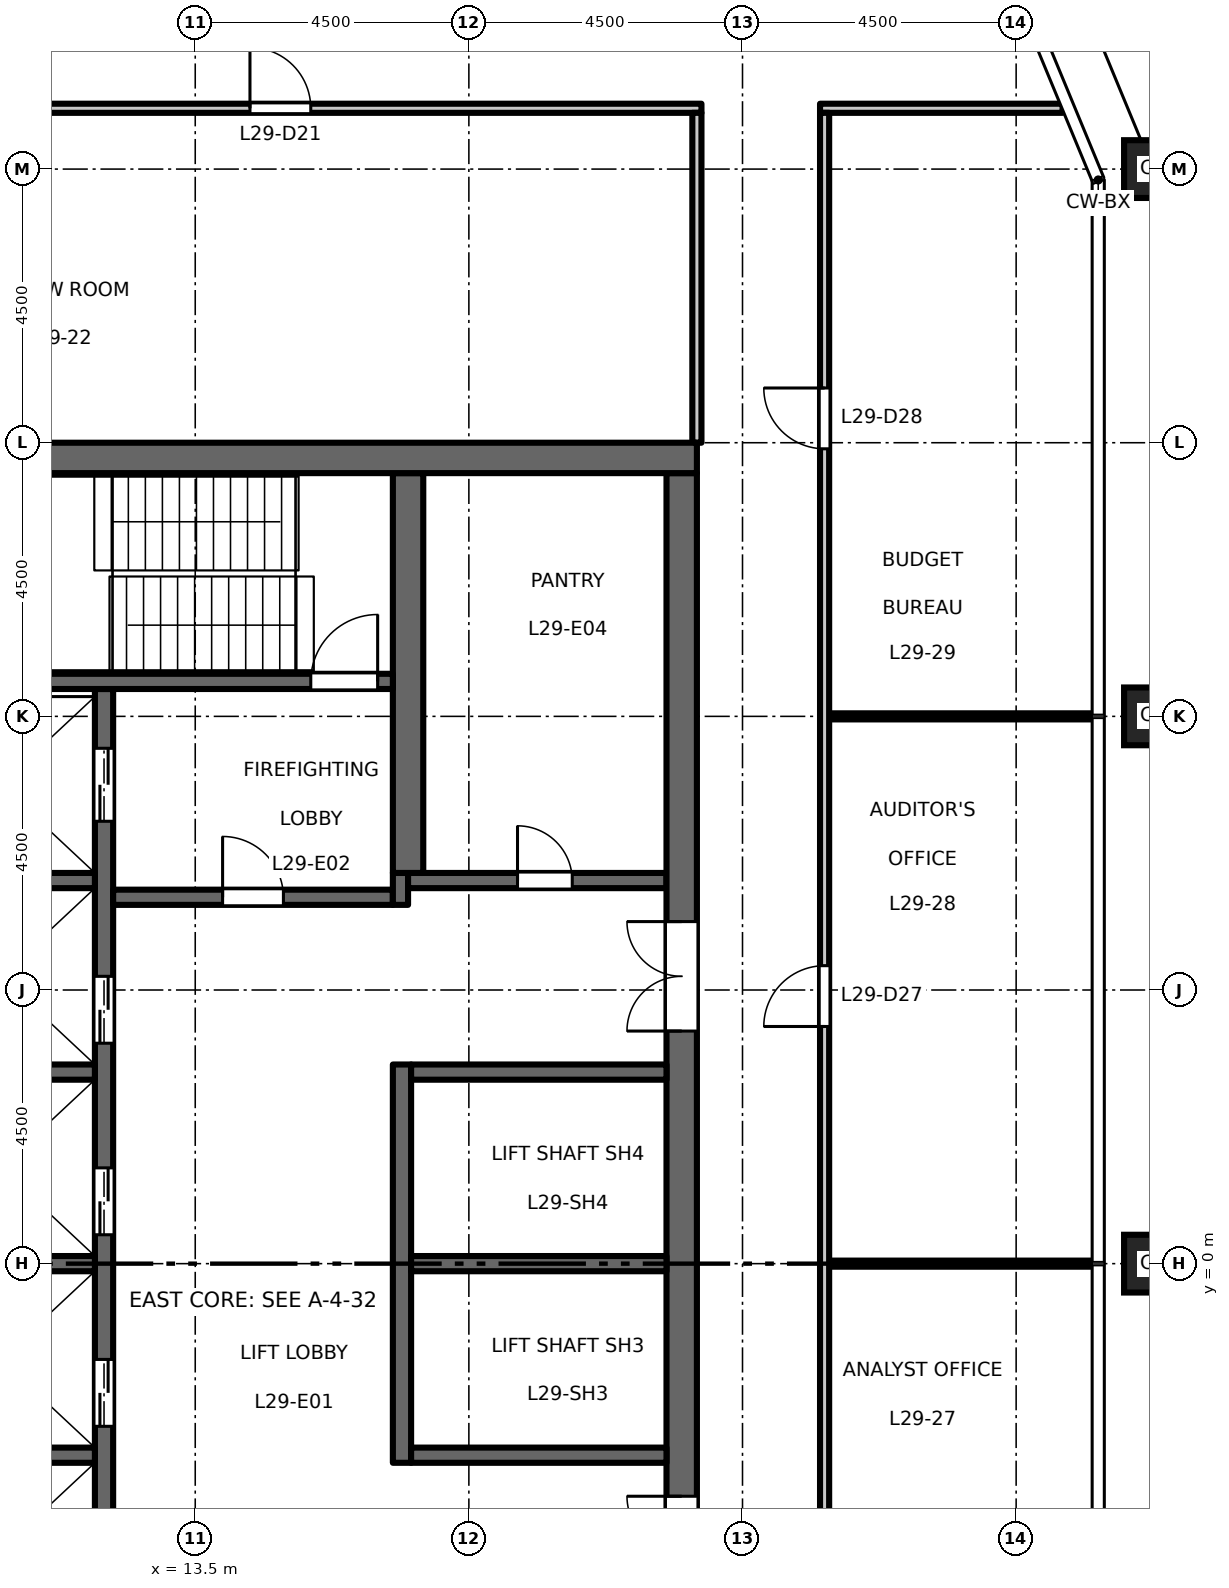
"""IFC4 building model, lengths in metres.
Left out: names, types, materials, properties, quantities, classifications, styles, units other than length and angle.
Written with IfcOpenShell. Run it as: python <this file> out.ifc"""

import sys

from ifc_helpers import new_model, si_unit, direction, frame, frame_2d, origin, origin_2d, place, context, subcontext, project, spatial, rectangle, hollow_rectangle, extrude, element, fill, save


model = new_model("IFC4")
c1 = context("Model", 3, precision=1e-05, world=origin(), true_north=direction((0.0, 1.0)))
c2 = subcontext(c1, "Body", "Model", "MODEL_VIEW")
j1 = project(units=[si_unit("LENGTHUNIT", "METRE"), si_unit("PLANEANGLEUNIT", "RADIAN")], contexts=[c1])
p1 = place(None, origin())
s1 = spatial("IfcSite", under=j1, at=p1, CompositionType="ELEMENT")
p2 = place(p1, origin())
s2 = spatial("IfcBuilding", under=s1, at=p2, CompositionType="ELEMENT")
p3 = place(p2, frame((0.0, 0.0, 136.2)))
s3 = spatial("IfcBuildingStorey", under=s2, at=p3, CompositionType="ELEMENT", Elevation=136.2)
for number, where, z_axis, x_axis in (
    (1, (29.25, 0.0, 0.0), (0.0, 0.0, 1.0), (1.0, 0.0, 0.0)),
    (2, (29.25, 9.0, 0.0), (0.0, 0.0, 1.0), (1.0, 0.0, 0.0)),
    (3, (29.25, 18.0, 0.0), (0.0, 0.0, 1.0), (1.0, 0.0, 0.0)),
):
    element("IfcColumn", number, at=place(p3, frame(where, z_axis=z_axis, x_axis=x_axis)), inside=s3, PredefinedType="COLUMN", context=c2, shape_type="SweptSolid", body=[
        extrude(hollow_rectangle(XDim=0.95, YDim=0.95, WallThickness=0.055, at=origin_2d()), origin(), (0.0, 0.0, 1.0), 4.5),
    ])
p4 = place(p3, frame((12.0, -9.45, 0.0), z_axis=(0.0, 0.0, 1.0), x_axis=(0.0, 1.0, 0.0)))
e4 = element("IfcWall", 4, at=p4, inside=s3, PredefinedType="SHEAR", context=c2, shape_type="SweptSolid", body=[
    extrude(rectangle(XDim=18.9, YDim=0.3, at=frame_2d((9.45, 0.0))), origin(), (0.0, 0.0, 1.0), 4.35),
])
p5 = place(p4, frame((3.625, 0.0, 0.0)))
e5 = element("IfcOpeningElement", 5, at=p5, cuts=e4, PredefinedType="OPENING", context=c2, shape_type="SweptSolid", body=[
    extrude(rectangle(XDim=1.1, YDim=2.1, at=frame_2d((0.55, 1.05))), frame((0.0, 0.16, 0.0), z_axis=(0.0, -1.0, 0.0), x_axis=(1.0, 0.0, 0.0)), (0.0, 0.0, 1.0), 0.32),
])
p6 = place(p4, frame((6.775, 0.0, 0.0)))
e6 = element("IfcOpeningElement", 6, at=p6, cuts=e4, PredefinedType="OPENING", context=c2, shape_type="SweptSolid", body=[
    extrude(rectangle(XDim=1.1, YDim=2.1, at=frame_2d((0.55, 1.05))), frame((0.0, 0.16, 0.0), z_axis=(0.0, -1.0, 0.0), x_axis=(1.0, 0.0, 0.0)), (0.0, 0.0, 1.0), 0.32),
])
p7 = place(p4, frame((9.925, 0.0, 0.0)))
e7 = element("IfcOpeningElement", 7, at=p7, cuts=e4, PredefinedType="OPENING", context=c2, shape_type="SweptSolid", body=[
    extrude(rectangle(XDim=1.1, YDim=2.1, at=frame_2d((0.55, 1.05))), frame((0.0, 0.16, 0.0), z_axis=(0.0, -1.0, 0.0), x_axis=(1.0, 0.0, 0.0)), (0.0, 0.0, 1.0), 0.32),
])
p8 = place(p4, frame((13.075, 0.0, 0.0)))
e8 = element("IfcOpeningElement", 8, at=p8, cuts=e4, PredefinedType="OPENING", context=c2, shape_type="SweptSolid", body=[
    extrude(rectangle(XDim=1.1, YDim=2.1, at=frame_2d((0.55, 1.05))), frame((0.0, 0.16, 0.0), z_axis=(0.0, -1.0, 0.0), x_axis=(1.0, 0.0, 0.0)), (0.0, 0.0, 1.0), 0.32),
])
p9 = place(p4, frame((16.725, 0.0, 0.0)))
e9 = element("IfcOpeningElement", 9, at=p9, cuts=e4, PredefinedType="OPENING", context=c2, shape_type="SweptSolid", body=[
    extrude(rectangle(XDim=1.2, YDim=2.1, at=frame_2d((0.6, 1.05))), frame((0.0, 0.16, 0.0), z_axis=(0.0, -1.0, 0.0), x_axis=(1.0, 0.0, 0.0)), (0.0, 0.0, 1.0), 0.32),
])
p10 = place(p4, frame((0.975, 0.0, 0.0)))
e10 = element("IfcOpeningElement", 10, at=p10, cuts=e4, PredefinedType="OPENING", context=c2, shape_type="SweptSolid", body=[
    extrude(rectangle(XDim=1.2, YDim=2.1, at=frame_2d((0.6, 1.05))), frame((0.0, 0.16, 0.0), z_axis=(0.0, -1.0, 0.0), x_axis=(1.0, 0.0, 0.0)), (0.0, 0.0, 1.0), 0.32),
])
p11 = place(p3, frame((12.15, 6.025, 0.0), z_axis=(0.0, 0.0, 1.0), x_axis=(1.0, 0.0, 0.0)))
e11 = element("IfcWall", 11, at=p11, inside=s3, PredefinedType="SHEAR", context=c2, shape_type="SweptSolid", body=[
    extrude(rectangle(XDim=4.6, YDim=0.25, at=frame_2d((2.3, 0.0))), origin(), (0.0, 0.0, 1.0), 4.35),
])
p12 = place(p11, frame((1.8, 0.0, 0.0)))
e12 = element("IfcOpeningElement", 12, at=p12, cuts=e11, PredefinedType="OPENING", context=c2, shape_type="SweptSolid", body=[
    extrude(rectangle(XDim=1.0, YDim=2.1, at=frame_2d((0.5, 1.05))), frame((0.0, 0.135, 0.0), z_axis=(0.0, -1.0, 0.0), x_axis=(1.0, 0.0, 0.0)), (0.0, 0.0, 1.0), 0.27),
])
p13 = place(p3, frame((16.875, 5.9, 0.0), z_axis=(0.0, 0.0, 1.0), x_axis=(0.0, 1.0, 0.0)))
e13 = element("IfcWall", 13, at=p13, inside=s3, PredefinedType="SHEAR", context=c2, shape_type="SweptSolid", body=[
    extrude(rectangle(XDim=0.525, YDim=0.25, at=frame_2d((0.263, 0.0))), origin(), (0.0, 0.0, 1.0), 4.35),
])
p14 = place(p3, frame((17.0, 6.3, 0.0), z_axis=(0.0, 0.0, 1.0), x_axis=(1.0, 0.0, 0.0)))
e14 = element("IfcWall", 14, at=p14, inside=s3, PredefinedType="SHEAR", context=c2, shape_type="SweptSolid", body=[
    extrude(rectangle(XDim=4.25, YDim=0.25, at=frame_2d((2.125, 0.0))), origin(), (0.0, 0.0, 1.0), 4.35),
])
p15 = place(p14, frame((1.8, 0.0, 0.0)))
e15 = element("IfcOpeningElement", 15, at=p15, cuts=e14, PredefinedType="OPENING", context=c2, shape_type="SweptSolid", body=[
    extrude(rectangle(XDim=0.9, YDim=2.1, at=frame_2d((0.45, 1.05))), frame((0.0, 0.135, 0.0), z_axis=(0.0, -1.0, 0.0), x_axis=(1.0, 0.0, 0.0)), (0.0, 0.0, 1.0), 0.27),
])
p16 = place(p3, frame((21.5, -13.0, 0.0), z_axis=(0.0, 0.0, 1.0), x_axis=(0.0, 1.0, 0.0)))
e16 = element("IfcWall", 16, at=p16, inside=s3, PredefinedType="SHEAR", context=c2, shape_type="SweptSolid", body=[
    extrude(rectangle(XDim=26.0, YDim=0.5, at=frame_2d((13.0, 0.0))), origin(), (0.0, 0.0, 1.0), 4.35),
])
p17 = place(p16, frame((16.825, 0.0, 0.0)))
e17 = element("IfcOpeningElement", 17, at=p17, cuts=e16, PredefinedType="OPENING", context=c2, shape_type="SweptSolid", body=[
    extrude(rectangle(XDim=1.8, YDim=2.1, at=frame_2d((0.9, 1.05))), frame((0.0, 0.26, 0.0), z_axis=(0.0, -1.0, 0.0), x_axis=(1.0, 0.0, 0.0)), (0.0, 0.0, 1.0), 0.52),
])
p18 = place(p16, frame((7.375, 0.0, 0.0)))
e18 = element("IfcOpeningElement", 18, at=p18, cuts=e16, PredefinedType="OPENING", context=c2, shape_type="SweptSolid", body=[
    extrude(rectangle(XDim=1.8, YDim=2.1, at=frame_2d((0.9, 1.05))), frame((0.0, 0.26, 0.0), z_axis=(0.0, -1.0, 0.0), x_axis=(1.0, 0.0, 0.0)), (0.0, 0.0, 1.0), 0.52),
])
p19 = place(p16, frame((2.65, 0.0, 0.0)))
e19 = element("IfcOpeningElement", 19, at=p19, cuts=e16, PredefinedType="OPENING", context=c2, shape_type="SweptSolid", body=[
    extrude(rectangle(XDim=0.9, YDim=2.1, at=frame_2d((0.45, 1.05))), frame((0.0, 0.26, 0.0), z_axis=(0.0, -1.0, 0.0), x_axis=(1.0, 0.0, 0.0)), (0.0, 0.0, 1.0), 0.52),
])
p20 = place(p3, frame((16.9, -3.275, 0.0), z_axis=(0.0, 0.0, 1.0), x_axis=(0.0, 1.0, 0.0)))
e20 = element("IfcWall", 20, at=p20, inside=s3, PredefinedType="SHEAR", context=c2, shape_type="SweptSolid", body=[
    extrude(rectangle(XDim=6.55, YDim=0.3, at=frame_2d((3.275, 0.0))), origin(), (0.0, 0.0, 1.0), 4.35),
])
for number, where, z_axis, x_axis in (
    (21, (17.05, 0.0, 0.0), (0.0, 0.0, 1.0), (1.0, 0.0, 0.0)),
    (22, (17.05, 3.15, 0.0), (0.0, 0.0, 1.0), (1.0, 0.0, 0.0)),
    (23, (17.05, -3.15, 0.0), (0.0, 0.0, 1.0), (1.0, 0.0, 0.0)),
):
    element("IfcWall", number, at=place(p3, frame(where, z_axis=z_axis, x_axis=x_axis)), inside=s3, PredefinedType="SHEAR", context=c2, shape_type="SweptSolid", body=[
        extrude(rectangle(XDim=4.2, YDim=0.25, at=frame_2d((2.1, 0.0))), origin(), (0.0, 0.0, 1.0), 4.35),
    ])
p21 = place(p3, frame((17.0, 6.425, 0.0), z_axis=(0.0, 0.0, 1.0), x_axis=(0.0, 1.0, 0.0)))
e24 = element("IfcWall", 24, at=p21, inside=s3, PredefinedType="SHEAR", context=c2, shape_type="SweptSolid", body=[
    extrude(rectangle(XDim=6.575, YDim=0.5, at=frame_2d((3.288, 0.0))), origin(), (0.0, 0.0, 1.0), 4.35),
])
for number, where, z_axis, x_axis in (
    (25, (8.75, 0.0, 0.0), (0.0, 0.0, 1.0), (1.0, 0.0, 0.0)),
    (26, (8.75, 3.15, 0.0), (0.0, 0.0, 1.0), (1.0, 0.0, 0.0)),
    (27, (8.75, 6.3, 0.0), (0.0, 0.0, 1.0), (1.0, 0.0, 0.0)),
    (28, (8.75, -3.15, 0.0), (0.0, 0.0, 1.0), (1.0, 0.0, 0.0)),
):
    element("IfcWall", number, at=place(p3, frame(where, z_axis=z_axis, x_axis=x_axis)), inside=s3, PredefinedType="SHEAR", context=c2, shape_type="SweptSolid", body=[
        extrude(rectangle(XDim=3.1, YDim=0.25, at=frame_2d((1.55, 0.0))), origin(), (0.0, 0.0, 1.0), 4.35),
    ])
p22 = place(p3, frame((8.75, 9.575, 0.0), z_axis=(0.0, 0.0, 1.0), x_axis=(1.0, 0.0, 0.0)))
e29 = element("IfcWall", 29, at=p22, inside=s3, PredefinedType="SHEAR", context=c2, shape_type="SweptSolid", body=[
    extrude(rectangle(XDim=8.0, YDim=0.25, at=frame_2d((4.0, 0.0))), origin(), (0.0, 0.0, 1.0), 4.35),
])
p23 = place(p22, frame((6.65, 0.0, 0.0)))
e30 = element("IfcOpeningElement", 30, at=p23, cuts=e29, PredefinedType="OPENING", context=c2, shape_type="SweptSolid", body=[
    extrude(rectangle(XDim=1.1, YDim=2.1, at=frame_2d((0.55, 1.05))), frame((0.0, 0.135, 0.0), z_axis=(0.0, -1.0, 0.0), x_axis=(1.0, 0.0, 0.0)), (0.0, 0.0, 1.0), 0.27),
])
p24 = place(p3, frame((8.25, 13.25, 0.0), z_axis=(0.0, 0.0, 1.0), x_axis=(1.0, 0.0, 0.0)))
e31 = element("IfcWall", 31, at=p24, inside=s3, PredefinedType="SHEAR", context=c2, shape_type="SweptSolid", body=[
    extrude(rectangle(XDim=13.5, YDim=0.5, at=frame_2d((6.75, 0.0))), origin(), (0.0, 0.0, 1.0), 4.35),
])
for number, where, z_axis, x_axis in (
    (32, (23.925, 0.0, 0.0), (0.0, 0.0, 1.0), (1.0, 0.0, 0.0)),
    (33, (23.925, 9.0, 0.0), (0.0, 0.0, 1.0), (1.0, 0.0, 0.0)),
):
    element("IfcWall", number, at=place(p3, frame(where, z_axis=z_axis, x_axis=x_axis)), inside=s3, PredefinedType="PARTITIONING", context=c2, shape_type="SweptSolid", body=[
        extrude(rectangle(XDim=4.335, YDim=0.1, at=frame_2d((2.167, 0.0))), origin(), (0.0, 0.0, 1.0), 4.35),
    ])
p25 = place(p3, frame((-21.825, 19.0, 0.0), z_axis=(0.0, 0.0, 1.0), x_axis=(1.0, 0.0, 0.0)))
e34 = element("IfcWall", 34, at=p25, inside=s3, PredefinedType="PARTITIONING", context=c2, shape_type="SweptSolid", body=[
    extrude(rectangle(XDim=43.65, YDim=0.15, at=frame_2d((21.825, 0.0))), origin(), (0.0, 0.0, 1.0), 4.35),
])
p26 = place(p25, frame((17.225, 0.0, 0.0)))
e35 = element("IfcOpeningElement", 35, at=p26, cuts=e34, PredefinedType="OPENING", context=c2, shape_type="SweptSolid", body=[
    extrude(rectangle(XDim=1.0, YDim=2.1, at=frame_2d((0.5, 1.05))), frame((0.0, 0.085, 0.0), z_axis=(0.0, -1.0, 0.0), x_axis=(1.0, 0.0, 0.0)), (0.0, 0.0, 1.0), 0.17),
])
p27 = place(p25, frame((25.475, 0.0, 0.0)))
e36 = element("IfcOpeningElement", 36, at=p27, cuts=e34, PredefinedType="OPENING", context=c2, shape_type="SweptSolid", body=[
    extrude(rectangle(XDim=1.0, YDim=2.1, at=frame_2d((0.5, 1.05))), frame((0.0, 0.085, 0.0), z_axis=(0.0, -1.0, 0.0), x_axis=(1.0, 0.0, 0.0)), (0.0, 0.0, 1.0), 0.17),
])
p28 = place(p25, frame((6.225, 0.0, 0.0)))
e37 = element("IfcOpeningElement", 37, at=p28, cuts=e34, PredefinedType="OPENING", context=c2, shape_type="SweptSolid", body=[
    extrude(rectangle(XDim=1.0, YDim=2.1, at=frame_2d((0.5, 1.05))), frame((0.0, 0.085, 0.0), z_axis=(0.0, -1.0, 0.0), x_axis=(1.0, 0.0, 0.0)), (0.0, 0.0, 1.0), 0.17),
])
p29 = place(p25, frame((36.225, 0.0, 0.0)))
e38 = element("IfcOpeningElement", 38, at=p29, cuts=e34, PredefinedType="OPENING", context=c2, shape_type="SweptSolid", body=[
    extrude(rectangle(XDim=1.0, YDim=2.1, at=frame_2d((0.5, 1.05))), frame((0.0, 0.085, 0.0), z_axis=(0.0, -1.0, 0.0), x_axis=(1.0, 0.0, 0.0)), (0.0, 0.0, 1.0), 0.17),
])
p30 = place(p3, frame((23.775, 19.0, 0.0), z_axis=(0.0, 0.0, 1.0), x_axis=(1.0, 0.0, 0.0)))
e39 = element("IfcWall", 39, at=p30, inside=s3, PredefinedType="PARTITIONING", context=c2, shape_type="SweptSolid", body=[
    extrude(rectangle(XDim=3.989, YDim=0.15, at=frame_2d((1.995, 0.0))), origin(), (0.0, 0.0, 1.0), 4.35),
])
p31 = place(p3, frame((21.75, 13.5, 0.0), z_axis=(0.0, 0.0, 1.0), x_axis=(0.0, 1.0, 0.0)))
e40 = element("IfcWall", 40, at=p31, inside=s3, PredefinedType="PARTITIONING", context=c2, shape_type="SweptSolid", body=[
    extrude(rectangle(XDim=5.425, YDim=0.15, at=frame_2d((2.712, 0.0))), origin(), (0.0, 0.0, 1.0), 4.35),
])
p32 = place(p3, frame((23.85, -18.925, 0.0), z_axis=(0.0, 0.0, 1.0), x_axis=(0.0, 1.0, 0.0)))
e41 = element("IfcWall", 41, at=p32, inside=s3, PredefinedType="PARTITIONING", context=c2, shape_type="SweptSolid", body=[
    extrude(rectangle(XDim=37.85, YDim=0.15, at=frame_2d((18.925, 0.0))), origin(), (0.0, 0.0, 1.0), 4.35),
])
p33 = place(p32, frame((4.325, 0.0, 0.0)))
e42 = element("IfcOpeningElement", 42, at=p33, cuts=e41, PredefinedType="OPENING", context=c2, shape_type="SweptSolid", body=[
    extrude(rectangle(XDim=1.0, YDim=2.1, at=frame_2d((0.5, 1.05))), frame((0.0, 0.085, 0.0), z_axis=(0.0, -1.0, 0.0), x_axis=(1.0, 0.0, 0.0)), (0.0, 0.0, 1.0), 0.17),
])
p34 = place(p32, frame((13.825, 0.0, 0.0)))
e43 = element("IfcOpeningElement", 43, at=p34, cuts=e41, PredefinedType="OPENING", context=c2, shape_type="SweptSolid", body=[
    extrude(rectangle(XDim=1.0, YDim=2.1, at=frame_2d((0.5, 1.05))), frame((0.0, 0.085, 0.0), z_axis=(0.0, -1.0, 0.0), x_axis=(1.0, 0.0, 0.0)), (0.0, 0.0, 1.0), 0.17),
])
p35 = place(p32, frame((22.825, 0.0, 0.0)))
e44 = element("IfcOpeningElement", 44, at=p35, cuts=e41, PredefinedType="OPENING", context=c2, shape_type="SweptSolid", body=[
    extrude(rectangle(XDim=1.0, YDim=2.1, at=frame_2d((0.5, 1.05))), frame((0.0, 0.085, 0.0), z_axis=(0.0, -1.0, 0.0), x_axis=(1.0, 0.0, 0.0)), (0.0, 0.0, 1.0), 0.17),
])
p36 = place(p32, frame((32.325, 0.0, 0.0)))
e45 = element("IfcOpeningElement", 45, at=p36, cuts=e41, PredefinedType="OPENING", context=c2, shape_type="SweptSolid", body=[
    extrude(rectangle(XDim=1.0, YDim=2.1, at=frame_2d((0.5, 1.05))), frame((0.0, 0.085, 0.0), z_axis=(0.0, -1.0, 0.0), x_axis=(1.0, 0.0, 0.0)), (0.0, 0.0, 1.0), 0.17),
])
p37 = place(p12, origin())
e46 = element("IfcDoor", 46, at=p37, inside=s3, OperationType="SINGLE_SWING_RIGHT", PredefinedType="DOOR", context=c2, shape_type="SweptSolid", body=[
    extrude(rectangle(XDim=1.0, YDim=2.1, at=frame_2d((0.5, 1.05))), frame((0.0, 0.025, 0.0), z_axis=(0.0, -1.0, 0.0), x_axis=(1.0, 0.0, 0.0)), (0.0, 0.0, 1.0), 0.05),
])
fill(e12, e46)
p38 = place(p23, origin())
e47 = element("IfcDoor", 47, at=p38, inside=s3, OperationType="SINGLE_SWING_LEFT", PredefinedType="DOOR", context=c2, shape_type="SweptSolid", body=[
    extrude(rectangle(XDim=1.1, YDim=2.1, at=frame_2d((0.55, 1.05))), frame((0.0, 0.025, 0.0), z_axis=(0.0, -1.0, 0.0), x_axis=(1.0, 0.0, 0.0)), (0.0, 0.0, 1.0), 0.05),
])
fill(e30, e47)
p39 = place(p17, origin())
e48 = element("IfcDoor", 48, at=p39, inside=s3, OperationType="DOUBLE_DOOR_DOUBLE_SWING", PredefinedType="DOOR", context=c2, shape_type="SweptSolid", body=[
    extrude(rectangle(XDim=1.8, YDim=2.1, at=frame_2d((0.9, 1.05))), frame((0.0, 0.025, 0.0), z_axis=(0.0, -1.0, 0.0), x_axis=(1.0, 0.0, 0.0)), (0.0, 0.0, 1.0), 0.05),
])
fill(e17, e48)
p40 = place(p18, origin())
e49 = element("IfcDoor", 49, at=p40, inside=s3, OperationType="DOUBLE_DOOR_DOUBLE_SWING", PredefinedType="DOOR", context=c2, shape_type="SweptSolid", body=[
    extrude(rectangle(XDim=1.8, YDim=2.1, at=frame_2d((0.9, 1.05))), frame((0.0, 0.025, 0.0), z_axis=(0.0, -1.0, 0.0), x_axis=(1.0, 0.0, 0.0)), (0.0, 0.0, 1.0), 0.05),
])
fill(e18, e49)
p41 = place(p6, origin())
e50 = element("IfcDoor", 50, at=p41, inside=s3, OperationType="DOUBLE_DOOR_SLIDING", PredefinedType="DOOR", context=c2, shape_type="SweptSolid", body=[
    extrude(rectangle(XDim=1.1, YDim=2.1, at=frame_2d((0.55, 1.05))), frame((0.0, 0.025, 0.0), z_axis=(0.0, -1.0, 0.0), x_axis=(1.0, 0.0, 0.0)), (0.0, 0.0, 1.0), 0.05),
])
fill(e6, e50)
p42 = place(p7, origin())
e51 = element("IfcDoor", 51, at=p42, inside=s3, OperationType="DOUBLE_DOOR_SLIDING", PredefinedType="DOOR", context=c2, shape_type="SweptSolid", body=[
    extrude(rectangle(XDim=1.1, YDim=2.1, at=frame_2d((0.55, 1.05))), frame((0.0, 0.025, 0.0), z_axis=(0.0, -1.0, 0.0), x_axis=(1.0, 0.0, 0.0)), (0.0, 0.0, 1.0), 0.05),
])
fill(e7, e51)
p43 = place(p8, origin())
e52 = element("IfcDoor", 52, at=p43, inside=s3, OperationType="DOUBLE_DOOR_SLIDING", PredefinedType="DOOR", context=c2, shape_type="SweptSolid", body=[
    extrude(rectangle(XDim=1.1, YDim=2.1, at=frame_2d((0.55, 1.05))), frame((0.0, 0.025, 0.0), z_axis=(0.0, -1.0, 0.0), x_axis=(1.0, 0.0, 0.0)), (0.0, 0.0, 1.0), 0.05),
])
fill(e8, e52)
p44 = place(p9, origin())
e53 = element("IfcDoor", 53, at=p44, inside=s3, OperationType="DOUBLE_DOOR_SLIDING", PredefinedType="DOOR", context=c2, shape_type="SweptSolid", body=[
    extrude(rectangle(XDim=1.2, YDim=2.1, at=frame_2d((0.6, 1.05))), frame((0.0, 0.025, 0.0), z_axis=(0.0, -1.0, 0.0), x_axis=(1.0, 0.0, 0.0)), (0.0, 0.0, 1.0), 0.05),
])
fill(e9, e53)
p45 = place(p15, origin())
e54 = element("IfcDoor", 54, at=p45, inside=s3, OperationType="SINGLE_SWING_RIGHT", PredefinedType="DOOR", context=c2, shape_type="SweptSolid", body=[
    extrude(rectangle(XDim=0.9, YDim=2.1, at=frame_2d((0.45, 1.05))), frame((0.0, 0.025, 0.0), z_axis=(0.0, -1.0, 0.0), x_axis=(1.0, 0.0, 0.0)), (0.0, 0.0, 1.0), 0.05),
])
fill(e15, e54)
p46 = place(p29, origin())
e55 = element("IfcDoor", 55, at=p46, inside=s3, OperationType="SINGLE_SWING_LEFT", PredefinedType="DOOR", context=c2, shape_type="SweptSolid", body=[
    extrude(rectangle(XDim=1.0, YDim=2.1, at=frame_2d((0.5, 1.05))), frame((0.0, 0.025, 0.0), z_axis=(0.0, -1.0, 0.0), x_axis=(1.0, 0.0, 0.0)), (0.0, 0.0, 1.0), 0.05),
])
fill(e38, e55)
p47 = place(p35, origin())
e56 = element("IfcDoor", 56, at=p47, inside=s3, OperationType="SINGLE_SWING_LEFT", PredefinedType="DOOR", context=c2, shape_type="SweptSolid", body=[
    extrude(rectangle(XDim=1.0, YDim=2.1, at=frame_2d((0.5, 1.05))), frame((0.0, 0.025, 0.0), z_axis=(0.0, -1.0, 0.0), x_axis=(1.0, 0.0, 0.0)), (0.0, 0.0, 1.0), 0.05),
])
fill(e44, e56)
p48 = place(p36, origin())
e57 = element("IfcDoor", 57, at=p48, inside=s3, OperationType="SINGLE_SWING_RIGHT", PredefinedType="DOOR", context=c2, shape_type="SweptSolid", body=[
    extrude(rectangle(XDim=1.0, YDim=2.1, at=frame_2d((0.5, 1.05))), frame((0.0, 0.025, 0.0), z_axis=(0.0, -1.0, 0.0), x_axis=(1.0, 0.0, 0.0)), (0.0, 0.0, 1.0), 0.05),
])
fill(e45, e57)
save(model, sys.argv[1])
